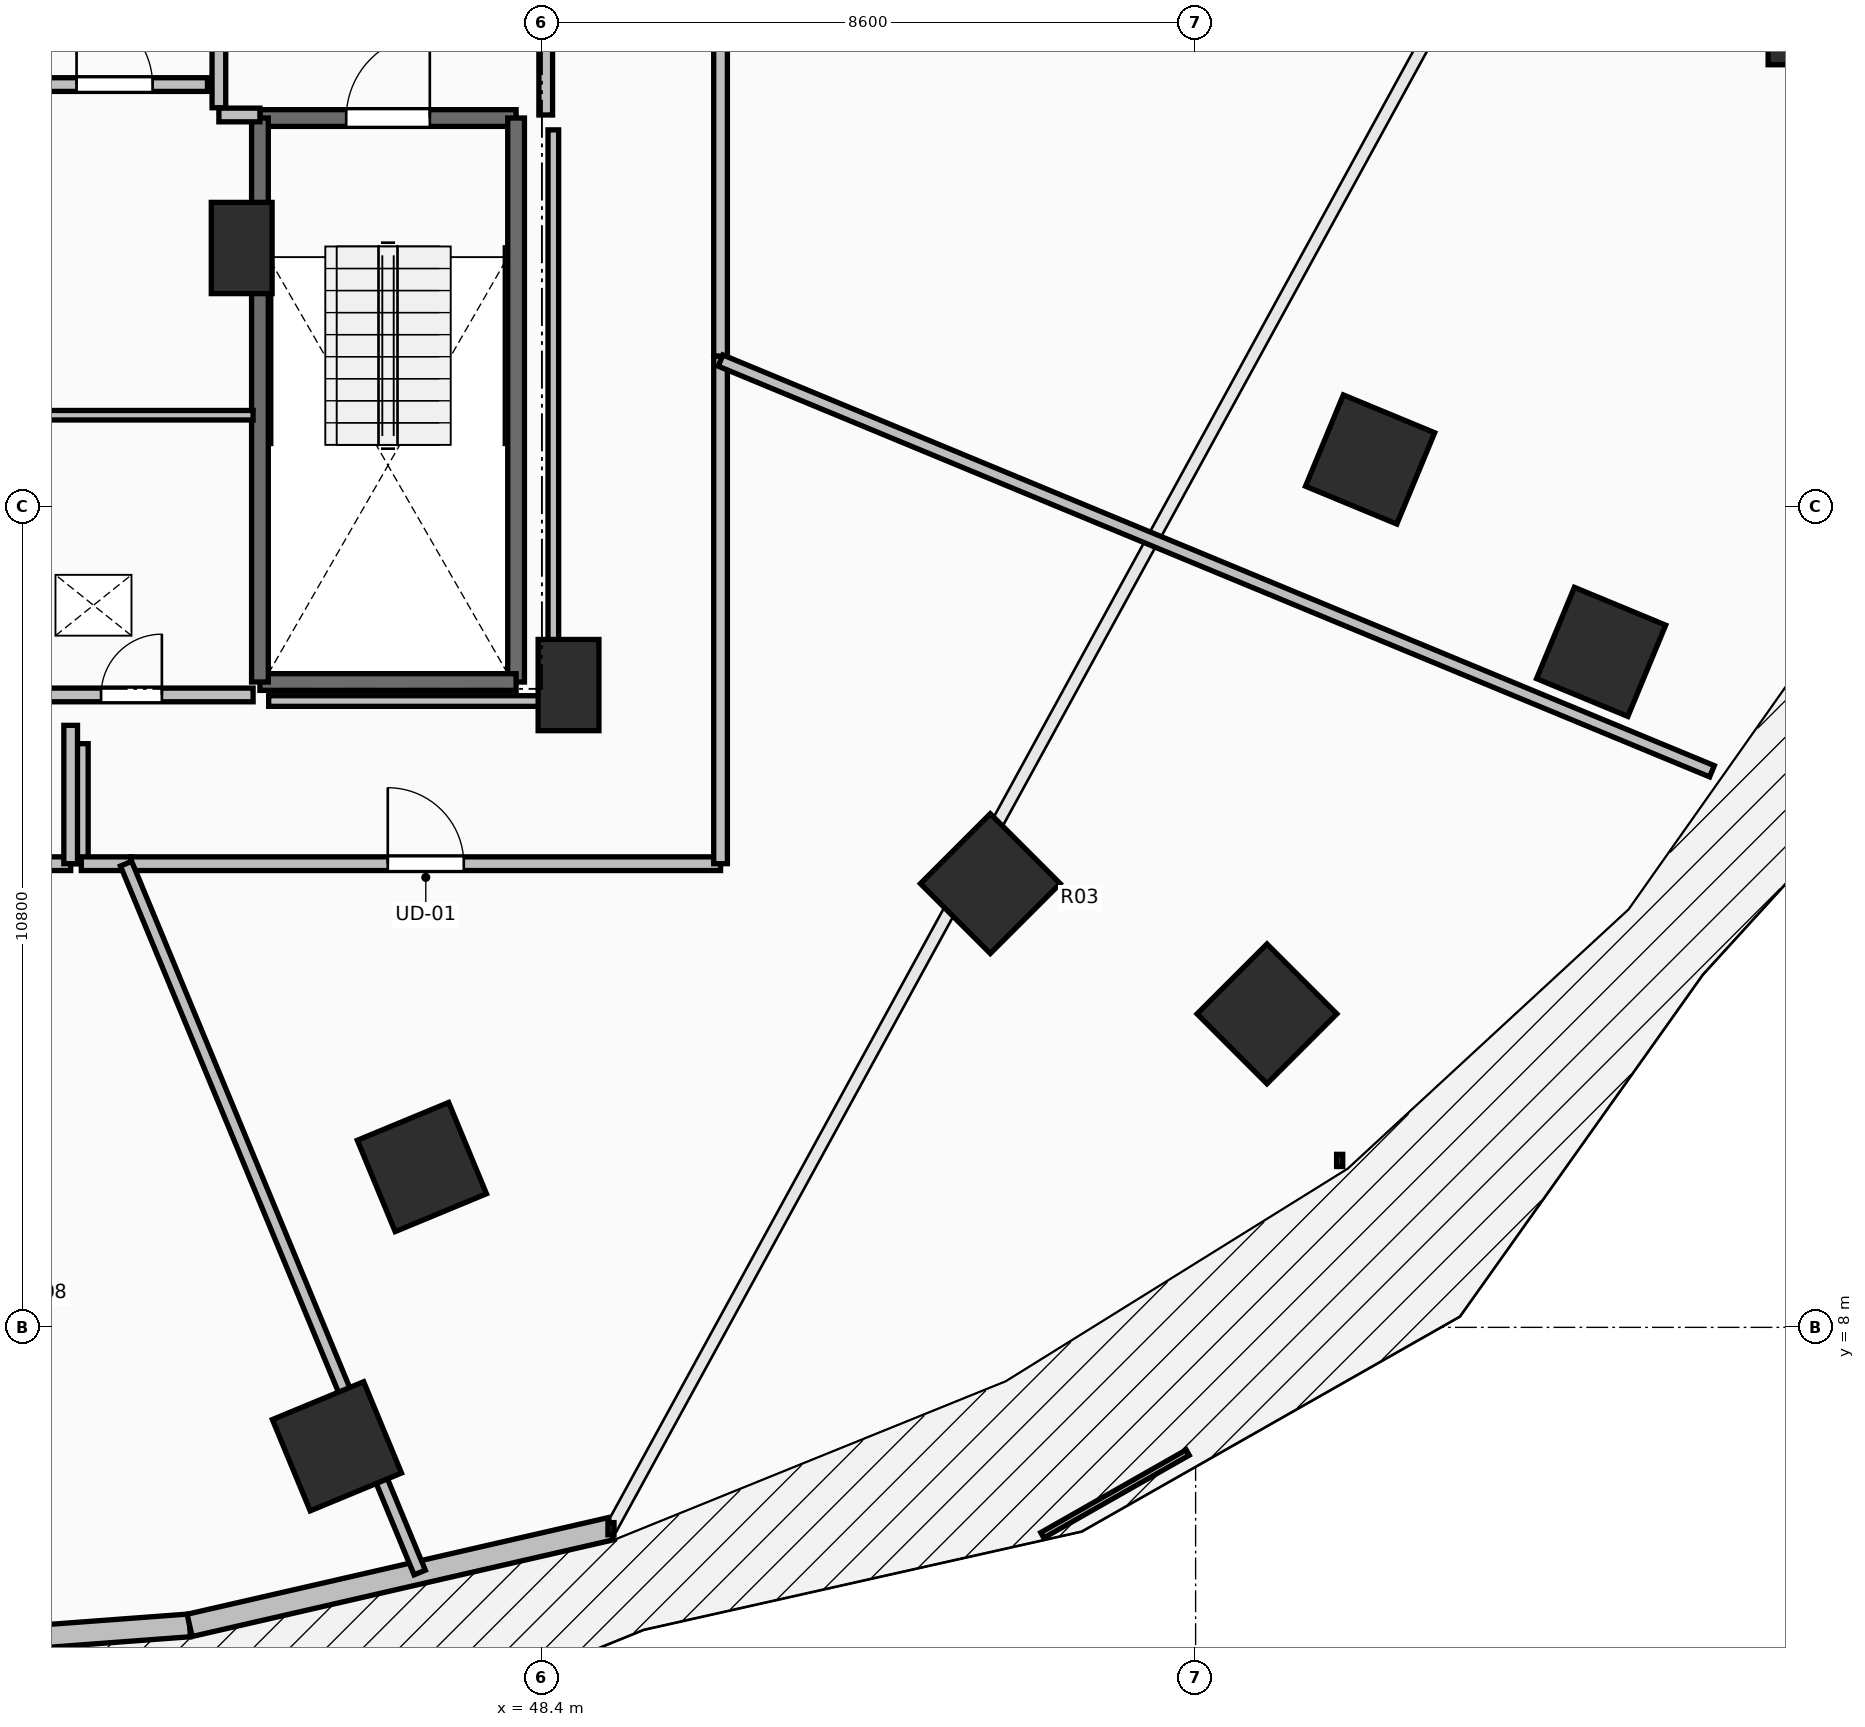
"""IFC4 building model, lengths in metres.
Left out: names, types, materials, properties, quantities, classifications, styles, units other than length and angle.
Written with IfcOpenShell. Run it as: python <this file> out.ifc"""

import sys

from ifc_helpers import new_model, si_unit, direction, frame, frame_2d, origin, origin_2d, place, context, subcontext, project, spatial, rectangle, extrude, element, fill, save


model = new_model("IFC4")
c1 = context("Model", 3, precision=1e-05, world=origin(), true_north=direction((0.0, 1.0)))
c2 = subcontext(c1, "Body", "Model", "MODEL_VIEW")
j1 = project(units=[si_unit("LENGTHUNIT", "METRE"), si_unit("PLANEANGLEUNIT", "RADIAN")], contexts=[c1])
p1 = place(None, origin())
s1 = spatial("IfcSite", under=j1, at=p1, CompositionType="ELEMENT")
p2 = place(p1, origin())
s2 = spatial("IfcBuilding", under=s1, at=p2, CompositionType="ELEMENT")
p3 = place(p2, frame((0.0, 0.0, 45.0)))
s3 = spatial("IfcBuildingStorey", under=s2, at=p3, CompositionType="ELEMENT", Elevation=45.0)
for number, where, z_axis, x_axis in (
    (1, (46.821, 10.109, 0.0), (0.0, 0.0, 1.0), (0.383, -0.924, 0.0)),
    (2, (54.299, 13.838, 0.0), (0.0, 0.0, 1.0), (0.707, -0.707, 0.0)),
    (3, (59.295, 19.418, 0.0), (0.0, 0.0, 1.0), (0.924, -0.383, 0.0)),
    (4, (65.182, 25.261, 0.0), (0.0, 0.0, 1.0), (1.0, 0.0, 0.0)),
    (5, (45.703, 6.435, 0.0), (0.0, 0.0, 1.0), (0.383, -0.924, 0.0)),
    (6, (57.939, 12.124, 0.0), (0.0, 0.0, 1.0), (0.707, -0.707, 0.0)),
    (7, (62.335, 16.886, 0.0), (0.0, 0.0, 1.0), (0.924, -0.383, 0.0)),
):
    element("IfcColumn", number, at=place(p3, frame(where, z_axis=z_axis, x_axis=x_axis)), inside=s3, PredefinedType="COLUMN", context=c2, shape_type="SweptSolid", body=[
        extrude(rectangle(XDim=1.3, YDim=1.3, at=origin_2d()), origin(), (0.0, 0.0, 1.0), 3.5),
    ])
for number, where, z_axis, x_axis in (
    (8, (48.75, 16.45, 0.0), (0.0, 0.0, 1.0), (1.0, 0.0, 0.0)),
    (9, (44.45, 22.2, 0.0), (0.0, 0.0, 1.0), (1.0, 0.0, 0.0)),
):
    element("IfcColumn", number, at=place(p3, frame(where, z_axis=z_axis, x_axis=x_axis)), inside=s3, PredefinedType="PILASTER", context=c2, shape_type="SweptSolid", body=[
        extrude(rectangle(XDim=0.8, YDim=1.2, at=origin_2d()), origin(), (0.0, 0.0, 1.0), 3.5),
    ])
p4 = place(p3, frame((38.0, 3.65, 0.0), z_axis=(0.0, 0.0, 1.0), x_axis=(0.99723690101, 0.074287032943, 0.0)))
e10 = element("IfcWall", 10, at=p4, inside=s3, PredefinedType="STANDARD", context=c2, shape_type="SweptSolid", body=[
    extrude(rectangle(XDim=5.781, YDim=0.3, at=frame_2d((2.89, 0.0))), origin(), (0.0, 0.0, 1.0), 3.24),
])
p5 = place(p4, frame((2.09, 0.0, 0.0)))
e11 = element("IfcOpeningElement", 11, at=p5, cuts=e10, PredefinedType="OPENING", context=c2, shape_type="SweptSolid", body=[
    extrude(rectangle(XDim=1.6, YDim=2.3, at=frame_2d((0.8, 1.15))), frame((0.0, 0.165, 0.0), z_axis=(0.0, -1.0, 0.0), x_axis=(1.0, 0.0, 0.0)), (0.0, 0.0, 1.0), 0.33),
])
p6 = place(p3, frame((43.765, 4.079, 0.0), z_axis=(0.0, 0.0, 1.0), x_axis=(0.974671141646, 0.223642942305, 0.0)))
e12 = element("IfcWall", 12, at=p6, inside=s3, PredefinedType="STANDARD", context=c2, shape_type="SweptSolid", body=[
    extrude(rectangle(XDim=5.688, YDim=0.3, at=frame_2d((2.844, 0.0))), origin(), (0.0, 0.0, 1.0), 3.24),
])
p7 = place(p3, frame((44.69, 23.91, 0.0), z_axis=(0.0, 0.0, 1.0), x_axis=(1.0, 0.0, 0.0)))
e13 = element("IfcWall", 13, at=p7, inside=s3, PredefinedType="SOLIDWALL", context=c2, shape_type="SweptSolid", body=[
    extrude(rectangle(XDim=3.37, YDim=0.22, at=frame_2d((1.685, 0.0))), origin(), (0.0, 0.0, 1.0), 3.24),
])
p8 = place(p7, frame((1.135, 0.0, 0.0)))
e14 = element("IfcOpeningElement", 14, at=p8, cuts=e13, PredefinedType="OPENING", context=c2, shape_type="SweptSolid", body=[
    extrude(rectangle(XDim=1.1, YDim=2.15, at=frame_2d((0.55, 1.075))), frame((0.0, 0.125, 0.0), z_axis=(0.0, -1.0, 0.0), x_axis=(1.0, 0.0, 0.0)), (0.0, 0.0, 1.0), 0.25),
])
p9 = place(p3, frame((48.06, 23.91, 0.0), z_axis=(0.0, 0.0, 1.0), x_axis=(0.0, -1.0, 0.0)))
e15 = element("IfcWall", 15, at=p9, inside=s3, PredefinedType="SOLIDWALL", context=c2, shape_type="SweptSolid", body=[
    extrude(rectangle(XDim=7.42, YDim=0.22, at=frame_2d((3.71, 0.0))), origin(), (0.0, 0.0, 1.0), 3.24),
])
p10 = place(p3, frame((48.06, 16.49, 0.0), z_axis=(0.0, 0.0, 1.0), x_axis=(-1.0, 0.0, 0.0)))
e16 = element("IfcWall", 16, at=p10, inside=s3, PredefinedType="SOLIDWALL", context=c2, shape_type="SweptSolid", body=[
    extrude(rectangle(XDim=3.37, YDim=0.22, at=frame_2d((1.685, 0.0))), origin(), (0.0, 0.0, 1.0), 3.24),
])
p11 = place(p3, frame((44.69, 16.49, 0.0), z_axis=(0.0, 0.0, 1.0), x_axis=(0.0, 1.0, 0.0)))
e17 = element("IfcWall", 17, at=p11, inside=s3, PredefinedType="SOLIDWALL", context=c2, shape_type="SweptSolid", body=[
    extrude(rectangle(XDim=7.42, YDim=0.22, at=frame_2d((3.71, 0.0))), origin(), (0.0, 0.0, 1.0), 3.24),
])
p12 = place(p3, frame((44.15, 27.955, 0.0), z_axis=(0.0, 0.0, 1.0), x_axis=(0.0, -1.0, 0.0)))
e18 = element("IfcWall", 18, at=p12, inside=s3, PredefinedType="PARTITIONING", context=c2, shape_type="SweptSolid", body=[
    extrude(rectangle(XDim=3.91, YDim=0.18, at=frame_2d((1.955, 0.0))), origin(), (0.0, 0.0, 1.0), 3.24),
])
p13 = place(p12, frame((1.355, 0.0, 0.0)))
e19 = element("IfcOpeningElement", 19, at=p13, cuts=e18, PredefinedType="OPENING", context=c2, shape_type="SweptSolid", body=[
    extrude(rectangle(XDim=1.2, YDim=2.15, at=frame_2d((0.6, 1.075))), frame((0.0, 0.105, 0.0), z_axis=(0.0, -1.0, 0.0), x_axis=(1.0, 0.0, 0.0)), (0.0, 0.0, 1.0), 0.21),
])
p14 = place(p3, frame((44.15, 23.95, 0.0), z_axis=(0.0, 0.0, 1.0), x_axis=(1.0, 0.0, 0.0)))
e20 = element("IfcWall", 20, at=p14, inside=s3, PredefinedType="PARTITIONING", context=c2, shape_type="SweptSolid", body=[
    extrude(rectangle(XDim=0.54, YDim=0.18, at=frame_2d((0.27, 0.0))), origin(), (0.0, 0.0, 1.0), 3.24),
])
p15 = place(p3, frame((48.45, 23.95, 0.0), z_axis=(0.0, 0.0, 1.0), x_axis=(0.0, 1.0, 0.0)))
e21 = element("IfcWall", 21, at=p15, inside=s3, PredefinedType="PARTITIONING", context=c2, shape_type="SweptSolid", body=[
    extrude(rectangle(XDim=4.05, YDim=0.18, at=frame_2d((2.025, 0.0))), origin(), (0.0, 0.0, 1.0), 3.24),
])
p16 = place(p15, frame((1.425, 0.0, 0.0)))
e22 = element("IfcOpeningElement", 22, at=p16, cuts=e21, PredefinedType="OPENING", context=c2, shape_type="SweptSolid", body=[
    extrude(rectangle(XDim=1.2, YDim=2.15, at=frame_2d((0.6, 1.075))), frame((0.0, 0.105, 0.0), z_axis=(0.0, -1.0, 0.0), x_axis=(1.0, 0.0, 0.0)), (0.0, 0.0, 1.0), 0.21),
])
p17 = place(p3, frame((41.555, 24.35, 0.0), z_axis=(0.0, 0.0, 1.0), x_axis=(1.0, 0.0, 0.0)))
e23 = element("IfcWall", 23, at=p17, inside=s3, PredefinedType="PARTITIONING", context=c2, shape_type="SweptSolid", body=[
    extrude(rectangle(XDim=2.445, YDim=0.18, at=frame_2d((1.223, 0.0))), origin(), (0.0, 0.0, 1.0), 3.24),
])
p18 = place(p17, frame((0.722, 0.0, 0.0)))
e24 = element("IfcOpeningElement", 24, at=p18, cuts=e23, PredefinedType="OPENING", context=c2, shape_type="SweptSolid", body=[
    extrude(rectangle(XDim=1.0, YDim=2.15, at=frame_2d((0.5, 1.075))), frame((0.0, 0.105, 0.0), z_axis=(0.0, -1.0, 0.0), x_axis=(1.0, 0.0, 0.0)), (0.0, 0.0, 1.0), 0.21),
])
p19 = place(p3, frame((44.6, 20.0, 0.0), z_axis=(0.0, 0.0, 1.0), x_axis=(-1.0, 0.0, 0.0)))
e25 = element("IfcWall", 25, at=p19, inside=s3, PredefinedType="PARTITIONING", context=c2, shape_type="SweptSolid", body=[
    extrude(rectangle(XDim=3.2, YDim=0.125, at=frame_2d((1.6, 0.0))), origin(), (0.0, 0.0, 1.0), 3.24),
])
p20 = place(p3, frame((41.4, 16.32, 0.0), z_axis=(0.0, 0.0, 1.0), x_axis=(1.0, 0.0, 0.0)))
e26 = element("IfcWall", 26, at=p20, inside=s3, PredefinedType="PARTITIONING", context=c2, shape_type="SweptSolid", body=[
    extrude(rectangle(XDim=3.2, YDim=0.18, at=frame_2d((1.6, 0.0))), origin(), (0.0, 0.0, 1.0), 3.24),
])
p21 = place(p20, frame((1.2, 0.0, 0.0)))
e27 = element("IfcOpeningElement", 27, at=p21, cuts=e26, PredefinedType="OPENING", context=c2, shape_type="SweptSolid", body=[
    extrude(rectangle(XDim=0.8, YDim=2.05, at=frame_2d((0.4, 1.025))), frame((0.0, 0.105, 0.0), z_axis=(0.0, -1.0, 0.0), x_axis=(1.0, 0.0, 0.0)), (0.0, 0.0, 1.0), 0.21),
])
p22 = place(p3, frame((42.34, 15.679, 0.0), z_axis=(0.0, 0.0, 1.0), x_axis=(0.0, -1.0, 0.0)))
e28 = element("IfcWall", 28, at=p22, inside=s3, PredefinedType="PARTITIONING", context=c2, shape_type="SweptSolid", body=[
    extrude(rectangle(XDim=1.579, YDim=0.18, at=frame_2d((0.79, 0.0))), origin(), (0.0, 0.0, 1.0), 3.24),
])
p23 = place(p3, frame((42.34, 14.1, 0.0), z_axis=(0.0, 0.0, 1.0), x_axis=(1.0, 0.0, 0.0)))
e29 = element("IfcWall", 29, at=p23, inside=s3, PredefinedType="PARTITIONING", context=c2, shape_type="SweptSolid", body=[
    extrude(rectangle(XDim=0.654, YDim=0.18, at=frame_2d((0.327, 0.0))), origin(), (0.0, 0.0, 1.0), 3.24),
])
p24 = place(p3, frame((38.689, 14.1, 0.0), z_axis=(0.0, 0.0, 1.0), x_axis=(1.0, 0.0, 0.0)))
e30 = element("IfcWall", 30, at=p24, inside=s3, PredefinedType="PARTITIONING", context=c2, shape_type="SweptSolid", body=[
    extrude(rectangle(XDim=3.511, YDim=0.18, at=frame_2d((1.755, 0.0))), origin(), (0.0, 0.0, 1.0), 3.24),
])
p25 = place(p24, frame((1.23, 0.0, 0.0)))
e31 = element("IfcOpeningElement", 31, at=p25, cuts=e30, PredefinedType="OPENING", context=c2, shape_type="SweptSolid", body=[
    extrude(rectangle(XDim=1.05, YDim=2.2, at=frame_2d((0.525, 1.1))), frame((0.0, 0.105, 0.0), z_axis=(0.0, -1.0, 0.0), x_axis=(1.0, 0.0, 0.0)), (0.0, 0.0, 1.0), 0.21),
])
p26 = place(p3, frame((42.2, 14.1, 0.0), z_axis=(0.0, 0.0, 1.0), x_axis=(0.0, 1.0, 0.0)))
e32 = element("IfcWall", 32, at=p26, inside=s3, PredefinedType="PARTITIONING", context=c2, shape_type="SweptSolid", body=[
    extrude(rectangle(XDim=1.82, YDim=0.18, at=frame_2d((0.91, 0.0))), origin(), (0.0, 0.0, 1.0), 3.24),
])
p27 = place(p3, frame((42.994, 14.1, 0.0), z_axis=(0.0, 0.0, 1.0), x_axis=(1.0, 0.0, 0.0)))
e33 = element("IfcWall", 33, at=p27, inside=s3, PredefinedType="PARTITIONING", context=c2, shape_type="SweptSolid", body=[
    extrude(rectangle(XDim=7.756, YDim=0.18, at=frame_2d((3.878, 0.0))), origin(), (0.0, 0.0, 1.0), 2.432),
])
p28 = place(p27, frame((3.378, 0.0, 0.0)))
e34 = element("IfcOpeningElement", 34, at=p28, cuts=e33, PredefinedType="OPENING", context=c2, shape_type="SweptSolid", body=[
    extrude(rectangle(XDim=1.0, YDim=2.15, at=frame_2d((0.5, 1.075))), frame((0.0, 0.105, 0.0), z_axis=(0.0, -1.0, 0.0), x_axis=(1.0, 0.0, 0.0)), (0.0, 0.0, 1.0), 0.21),
])
p29 = place(p3, frame((50.75, 14.1, 0.0), z_axis=(0.0, 0.0, 1.0), x_axis=(0.0, 1.0, 0.0)))
e35 = element("IfcWall", 35, at=p29, inside=s3, PredefinedType="PARTITIONING", context=c2, shape_type="SweptSolid", body=[
    extrude(rectangle(XDim=6.679, YDim=0.18, at=frame_2d((3.339, 0.0))), origin(), (0.0, 0.0, 1.0), 2.432),
])
p30 = place(p3, frame((50.75, 20.779, 0.0), z_axis=(0.0, 0.0, 1.0), x_axis=(0.0, 1.0, 0.0)))
e36 = element("IfcWall", 36, at=p30, inside=s3, PredefinedType="PARTITIONING", context=c2, shape_type="SweptSolid", body=[
    extrude(rectangle(XDim=10.302, YDim=0.18, at=frame_2d((5.151, 0.0))), origin(), (0.0, 0.0, 1.0), 2.432),
])
p31 = place(p30, frame((4.651, 0.0, 0.0)))
e37 = element("IfcOpeningElement", 37, at=p31, cuts=e36, PredefinedType="OPENING", context=c2, shape_type="SweptSolid", body=[
    extrude(rectangle(XDim=1.0, YDim=2.15, at=frame_2d((0.5, 1.075))), frame((0.0, 0.105, 0.0), z_axis=(0.0, -1.0, 0.0), x_axis=(1.0, 0.0, 0.0)), (0.0, 0.0, 1.0), 0.21),
])
p32 = place(p3, frame((46.792, 4.775, 0.0), z_axis=(0.0, 0.0, 1.0), x_axis=(-0.382718503749, 0.923865004689, 0.0)))
e38 = element("IfcWall", 38, at=p32, inside=s3, PredefinedType="PARTITIONING", context=c2, shape_type="SweptSolid", body=[
    extrude(rectangle(XDim=10.094, YDim=0.16, at=frame_2d((5.047, 0.0))), origin(), (0.0, 0.0, 1.0), 2.432),
])
p33 = place(p3, frame((63.793, 15.316, 0.0), z_axis=(0.0, 0.0, 1.0), x_axis=(-0.923866969846, 0.382713759914, 0.0)))
e39 = element("IfcWall", 39, at=p33, inside=s3, PredefinedType="PARTITIONING", context=c2, shape_type="SweptSolid", body=[
    extrude(rectangle(XDim=14.118, YDim=0.16, at=frame_2d((7.059, 0.0))), origin(), (0.0, 0.0, 1.0), 2.624),
])
p34 = place(p3, frame((48.55, 23.754, 0.0), z_axis=(0.0, 0.0, 1.0), x_axis=(0.0, -1.0, 0.0)))
e40 = element("IfcWall", 40, at=p34, inside=s3, PredefinedType="PARTITIONING", context=c2, shape_type="SweptSolid", body=[
    extrude(rectangle(XDim=7.514, YDim=0.14, at=frame_2d((3.757, 0.0))), origin(), (0.0, 0.0, 1.0), 2.432),
])
p35 = place(p3, frame((48.55, 16.24, 0.0), z_axis=(0.0, 0.0, 1.0), x_axis=(-1.0, 0.0, 0.0)))
e41 = element("IfcWall", 41, at=p35, inside=s3, PredefinedType="PARTITIONING", context=c2, shape_type="SweptSolid", body=[
    extrude(rectangle(XDim=3.745, YDim=0.14, at=frame_2d((1.873, 0.0))), origin(), (0.0, 0.0, 1.0), 2.432),
])
p36 = place(p8, origin())
e42 = element("IfcDoor", 42, at=p36, inside=s3, OperationType="SINGLE_SWING_RIGHT", PredefinedType="DOOR", context=c2, shape_type="SweptSolid", body=[
    extrude(rectangle(XDim=1.1, YDim=2.15, at=frame_2d((0.55, 1.075))), frame((0.0, 0.025, 0.0), z_axis=(0.0, -1.0, 0.0), x_axis=(1.0, 0.0, 0.0)), (0.0, 0.0, 1.0), 0.05),
])
fill(e14, e42)
p37 = place(p18, origin())
e43 = element("IfcDoor", 43, at=p37, inside=s3, OperationType="SINGLE_SWING_LEFT", PredefinedType="DOOR", context=c2, shape_type="SweptSolid", body=[
    extrude(rectangle(XDim=1.0, YDim=2.15, at=frame_2d((0.5, 1.075))), frame((0.0, 0.025, 0.0), z_axis=(0.0, -1.0, 0.0), x_axis=(1.0, 0.0, 0.0)), (0.0, 0.0, 1.0), 0.05),
])
fill(e24, e43)
p38 = place(p21, origin())
e44 = element("IfcDoor", 44, at=p38, inside=s3, OperationType="SINGLE_SWING_RIGHT", PredefinedType="DOOR", context=c2, shape_type="SweptSolid", body=[
    extrude(rectangle(XDim=0.8, YDim=2.05, at=frame_2d((0.4, 1.025))), frame((0.0, 0.025, 0.0), z_axis=(0.0, -1.0, 0.0), x_axis=(1.0, 0.0, 0.0)), (0.0, 0.0, 1.0), 0.05),
])
fill(e27, e44)
p39 = place(p28, origin())
e45 = element("IfcDoor", 45, at=p39, inside=s3, OperationType="SINGLE_SWING_LEFT", PredefinedType="DOOR", context=c2, shape_type="SweptSolid", body=[
    extrude(rectangle(XDim=1.0, YDim=2.15, at=frame_2d((0.5, 1.075))), frame((0.0, 0.025, 0.0), z_axis=(0.0, -1.0, 0.0), x_axis=(1.0, 0.0, 0.0)), (0.0, 0.0, 1.0), 0.05),
])
fill(e34, e45)
save(model, sys.argv[1])
